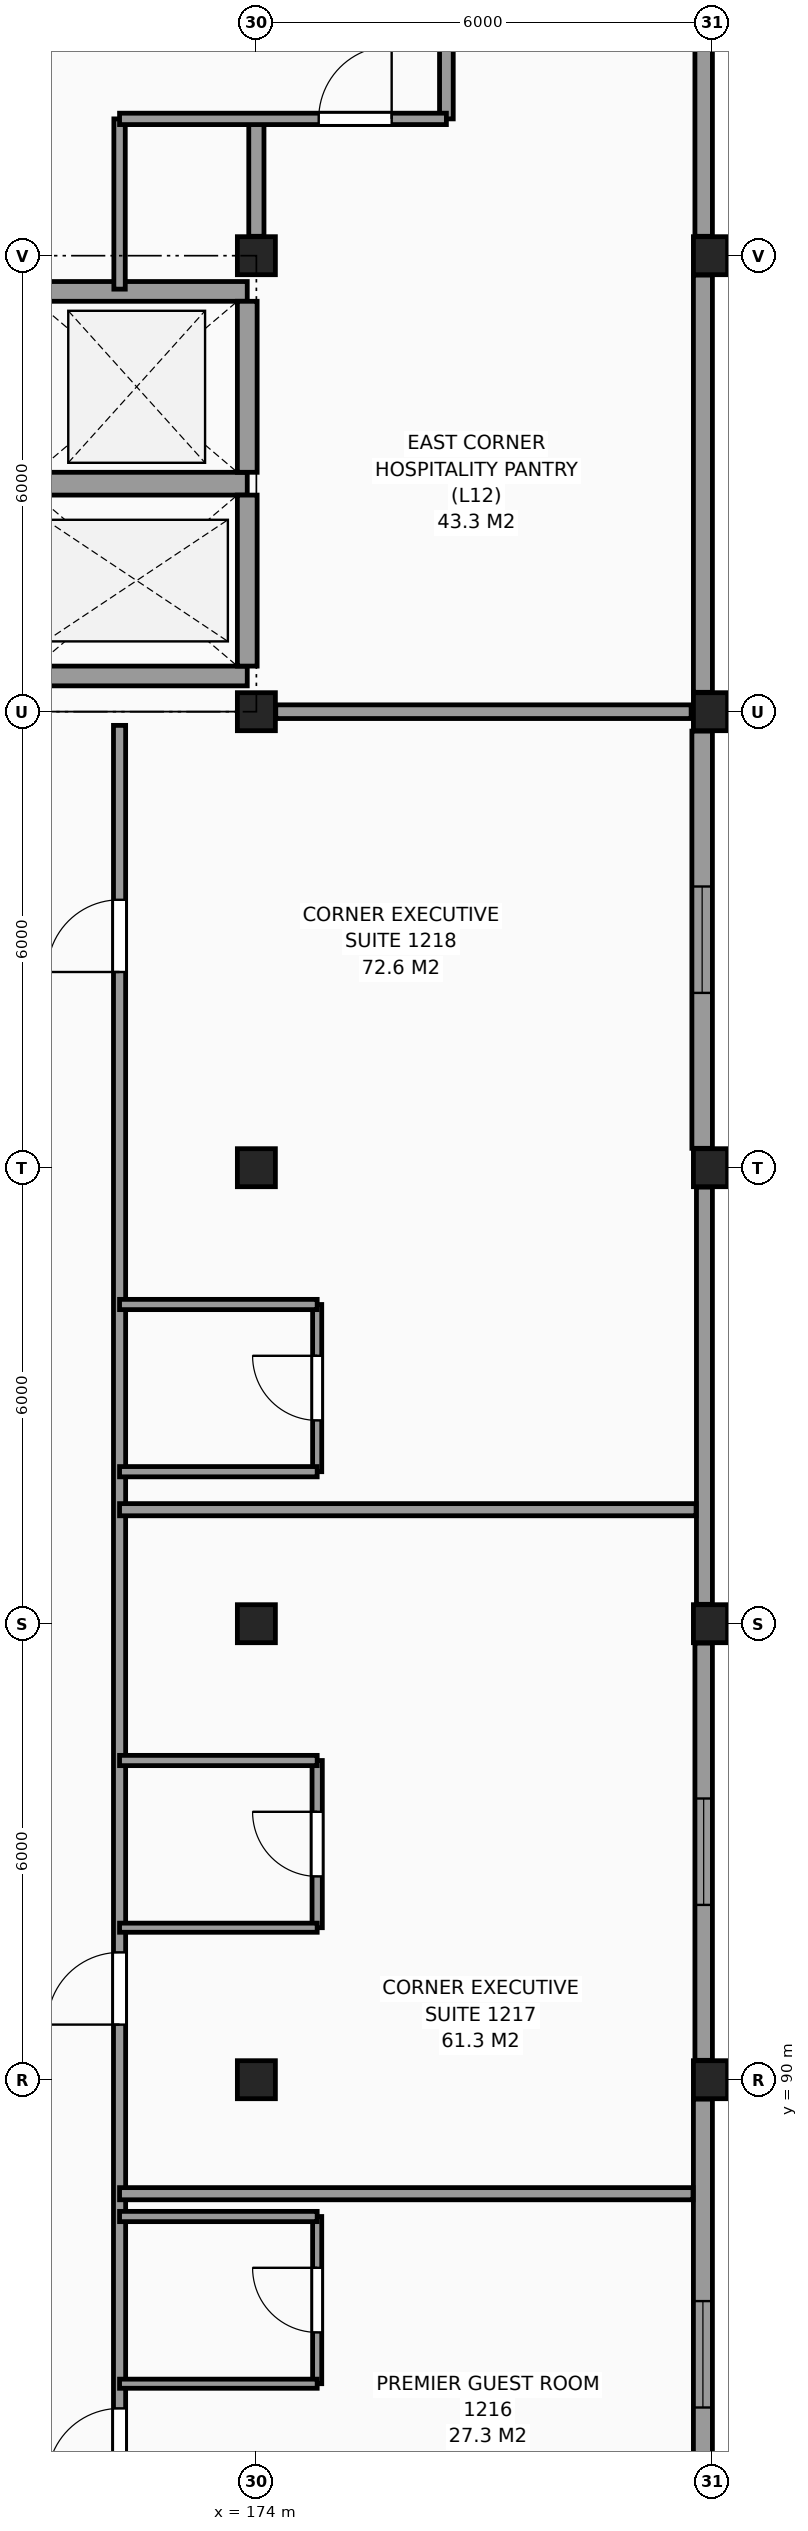
"""IFC4 building model, lengths in metres.
Left out: names, types, materials, properties, quantities, classifications, styles, units other than length and angle.
Written with IfcOpenShell. Run it as: python <this file> out.ifc"""

import sys

from ifc_helpers import new_model, si_unit, direction, frame, frame_2d, origin, origin_2d, place, context, subcontext, project, spatial, rectangle, extrude, element, fill, save


model = new_model("IFC4")
c1 = context("Model", 3, precision=1e-05, world=origin(), true_north=direction((0.0, 1.0)))
c2 = subcontext(c1, "Body", "Model", "MODEL_VIEW")
j1 = project(units=[si_unit("LENGTHUNIT", "METRE"), si_unit("PLANEANGLEUNIT", "RADIAN")], contexts=[c1])
p1 = place(None, origin())
s1 = spatial("IfcSite", under=j1, at=p1, CompositionType="ELEMENT")
p2 = place(p1, origin())
s2 = spatial("IfcBuilding", under=s1, at=p2, CompositionType="ELEMENT")
p3 = place(p2, frame((0.0, 0.0, 48.0)))
s3 = spatial("IfcBuildingStorey", under=s2, at=p3, CompositionType="ELEMENT", Elevation=48.0)
for number, where, z_axis, x_axis in (
    (1, (174.0, 90.0, 0.0), (0.0, 0.0, 1.0), (1.0, 0.0, 0.0)),
    (2, (174.0, 96.0, 0.0), (0.0, 0.0, 1.0), (1.0, 0.0, 0.0)),
    (3, (174.0, 102.0, 0.0), (0.0, 0.0, 1.0), (1.0, 0.0, 0.0)),
    (4, (174.0, 108.0, 0.0), (0.0, 0.0, 1.0), (1.0, 0.0, 0.0)),
    (5, (174.0, 114.0, 0.0), (0.0, 0.0, 1.0), (1.0, 0.0, 0.0)),
    (6, (180.0, 90.0, 0.0), (0.0, 0.0, 1.0), (1.0, 0.0, 0.0)),
    (7, (180.0, 96.0, 0.0), (0.0, 0.0, 1.0), (1.0, 0.0, 0.0)),
    (8, (180.0, 102.0, 0.0), (0.0, 0.0, 1.0), (1.0, 0.0, 0.0)),
    (9, (180.0, 108.0, 0.0), (0.0, 0.0, 1.0), (1.0, 0.0, 0.0)),
    (10, (180.0, 114.0, 0.0), (0.0, 0.0, 1.0), (1.0, 0.0, 0.0)),
):
    element("IfcColumn", number, at=place(p3, frame(where, z_axis=z_axis, x_axis=x_axis)), inside=s3, PredefinedType="COLUMN", context=c2, shape_type="SweptSolid", body=[
        extrude(rectangle(XDim=0.5, YDim=0.5, at=origin_2d()), origin(), (0.0, 0.0, 1.0), 3.3),
    ])
p4 = place(p3, frame((179.875, 84.255, 0.0), z_axis=(0.0, 0.0, 1.0), x_axis=(0.0, 1.0, 0.0)))
e11 = element("IfcWall", 11, at=p4, inside=s3, PredefinedType="SOLIDWALL", context=c2, shape_type="SweptSolid", body=[
    extrude(rectangle(XDim=5.49, YDim=0.25, at=frame_2d((2.745, 0.0))), origin(), (0.0, 0.0, 1.0), 2.4),
])
p5 = place(p4, frame((1.432, 0.0, 0.8)))
e12 = element("IfcOpeningElement", 12, at=p5, cuts=e11, PredefinedType="OPENING", context=c2, shape_type="SweptSolid", body=[
    extrude(rectangle(XDim=1.4, YDim=1.4, at=frame_2d((0.7, 0.7))), frame((0.0, 0.135, 0.0), z_axis=(0.0, -1.0, 0.0), x_axis=(1.0, 0.0, 0.0)), (0.0, 0.0, 1.0), 0.27),
])
p6 = place(p3, frame((179.885, 90.255, 0.0), z_axis=(0.0, 0.0, 1.0), x_axis=(0.0, 1.0, 0.0)))
e13 = element("IfcWall", 13, at=p6, inside=s3, PredefinedType="SOLIDWALL", context=c2, shape_type="SweptSolid", body=[
    extrude(rectangle(XDim=5.49, YDim=0.23, at=frame_2d((2.745, 0.0))), origin(), (0.0, 0.0, 1.0), 2.4),
])
p7 = place(p6, frame((2.045, 0.0, 0.8)))
e14 = element("IfcOpeningElement", 14, at=p7, cuts=e13, PredefinedType="OPENING", context=c2, shape_type="SweptSolid", body=[
    extrude(rectangle(XDim=1.4, YDim=1.4, at=frame_2d((0.7, 0.7))), frame((0.0, 0.125, 0.0), z_axis=(0.0, -1.0, 0.0), x_axis=(1.0, 0.0, 0.0)), (0.0, 0.0, 1.0), 0.25),
])
p8 = place(p3, frame((179.895, 96.255, 0.0), z_axis=(0.0, 0.0, 1.0), x_axis=(0.0, 1.0, 0.0)))
e15 = element("IfcWall", 15, at=p8, inside=s3, PredefinedType="SOLIDWALL", context=c2, shape_type="SweptSolid", body=[
    extrude(rectangle(XDim=5.49, YDim=0.21, at=frame_2d((2.745, 0.0))), origin(), (0.0, 0.0, 1.0), 2.4),
])
p9 = place(p3, frame((179.865, 102.255, 0.0), z_axis=(0.0, 0.0, 1.0), x_axis=(0.0, 1.0, 0.0)))
e16 = element("IfcWall", 16, at=p9, inside=s3, PredefinedType="SOLIDWALL", context=c2, shape_type="SweptSolid", body=[
    extrude(rectangle(XDim=5.49, YDim=0.27, at=frame_2d((2.745, 0.0))), origin(), (0.0, 0.0, 1.0), 2.4),
])
p10 = place(p9, frame((2.045, 0.0, 0.8)))
e17 = element("IfcOpeningElement", 17, at=p10, cuts=e16, PredefinedType="OPENING", context=c2, shape_type="SweptSolid", body=[
    extrude(rectangle(XDim=1.4, YDim=1.4, at=frame_2d((0.7, 0.7))), frame((0.0, 0.145, 0.0), z_axis=(0.0, -1.0, 0.0), x_axis=(1.0, 0.0, 0.0)), (0.0, 0.0, 1.0), 0.29),
])
p11 = place(p3, frame((179.875, 108.255, 0.0), z_axis=(0.0, 0.0, 1.0), x_axis=(0.0, 1.0, 0.0)))
e18 = element("IfcWall", 18, at=p11, inside=s3, PredefinedType="SOLIDWALL", context=c2, shape_type="SweptSolid", body=[
    extrude(rectangle(XDim=5.49, YDim=0.25, at=frame_2d((2.745, 0.0))), origin(), (0.0, 0.0, 1.0), 2.4),
])
p12 = place(p3, frame((179.885, 114.255, 0.0), z_axis=(0.0, 0.0, 1.0), x_axis=(0.0, 1.0, 0.0)))
e19 = element("IfcWall", 19, at=p12, inside=s3, PredefinedType="SOLIDWALL", context=c2, shape_type="SweptSolid", body=[
    extrude(rectangle(XDim=5.49, YDim=0.23, at=frame_2d((2.745, 0.0))), origin(), (0.0, 0.0, 1.0), 2.4),
])
p13 = place(p3, frame((170.97, 108.47, 0.0), z_axis=(0.0, 0.0, 1.0), x_axis=(1.0, 0.0, 0.0)))
e20 = element("IfcWall", 20, at=p13, inside=s3, PredefinedType="SHEAR", context=c2, shape_type="SweptSolid", body=[
    extrude(rectangle(XDim=2.91, YDim=0.26, at=frame_2d((1.455, 0.0))), origin(), (0.0, 0.0, 1.0), 3.3),
])
p14 = place(p3, frame((170.97, 111.0, 0.0), z_axis=(0.0, 0.0, 1.0), x_axis=(1.0, 0.0, 0.0)))
e21 = element("IfcWall", 21, at=p14, inside=s3, PredefinedType="SHEAR", context=c2, shape_type="SweptSolid", body=[
    extrude(rectangle(XDim=2.91, YDim=0.3, at=frame_2d((1.455, 0.0))), origin(), (0.0, 0.0, 1.0), 3.3),
])
p15 = place(p3, frame((173.88, 108.6, 0.0), z_axis=(0.0, 0.0, 1.0), x_axis=(0.0, 1.0, 0.0)))
e22 = element("IfcWall", 22, at=p15, inside=s3, PredefinedType="SHEAR", context=c2, shape_type="SweptSolid", body=[
    extrude(rectangle(XDim=2.25, YDim=0.26, at=frame_2d((1.125, 0.0))), origin(), (0.0, 0.0, 1.0), 3.3),
])
p16 = place(p3, frame((170.97, 113.53, 0.0), z_axis=(0.0, 0.0, 1.0), x_axis=(1.0, 0.0, 0.0)))
e23 = element("IfcWall", 23, at=p16, inside=s3, PredefinedType="SHEAR", context=c2, shape_type="SweptSolid", body=[
    extrude(rectangle(XDim=2.91, YDim=0.26, at=frame_2d((1.455, 0.0))), origin(), (0.0, 0.0, 1.0), 3.3),
])
p17 = place(p3, frame((173.88, 111.15, 0.0), z_axis=(0.0, 0.0, 1.0), x_axis=(0.0, 1.0, 0.0)))
e24 = element("IfcWall", 24, at=p17, inside=s3, PredefinedType="SHEAR", context=c2, shape_type="SweptSolid", body=[
    extrude(rectangle(XDim=2.25, YDim=0.26, at=frame_2d((1.125, 0.0))), origin(), (0.0, 0.0, 1.0), 3.3),
])
p18 = place(p3, frame((172.2, 66.235, 0.0), z_axis=(0.0, 0.0, 1.0), x_axis=(0.0, 1.0, 0.0)))
e25 = element("IfcWall", 25, at=p18, inside=s3, PredefinedType="PARTITIONING", context=c2, shape_type="SweptSolid", body=[
    extrude(rectangle(XDim=41.585, YDim=0.16, at=frame_2d((20.792, 0.0))), origin(), (0.0, 0.0, 1.0), 3.05),
])
p19 = place(p18, frame((7.59, 0.0, 0.0)))
e26 = element("IfcOpeningElement", 26, at=p19, cuts=e25, PredefinedType="OPENING", context=c2, shape_type="SweptSolid", body=[
    extrude(rectangle(XDim=0.95, YDim=2.1, at=frame_2d((0.475, 1.05))), frame((0.0, 0.09, 0.0), z_axis=(0.0, -1.0, 0.0), x_axis=(1.0, 0.0, 0.0)), (0.0, 0.0, 1.0), 0.18),
])
p20 = place(p18, frame((12.09, 0.0, 0.0)))
e27 = element("IfcOpeningElement", 27, at=p20, cuts=e25, PredefinedType="OPENING", context=c2, shape_type="SweptSolid", body=[
    extrude(rectangle(XDim=0.95, YDim=2.1, at=frame_2d((0.475, 1.05))), frame((0.0, 0.09, 0.0), z_axis=(0.0, -1.0, 0.0), x_axis=(1.0, 0.0, 0.0)), (0.0, 0.0, 1.0), 0.18),
])
p21 = place(p18, frame((16.29, 0.0, 0.0)))
e28 = element("IfcOpeningElement", 28, at=p21, cuts=e25, PredefinedType="OPENING", context=c2, shape_type="SweptSolid", body=[
    extrude(rectangle(XDim=0.95, YDim=2.1, at=frame_2d((0.475, 1.05))), frame((0.0, 0.09, 0.0), z_axis=(0.0, -1.0, 0.0), x_axis=(1.0, 0.0, 0.0)), (0.0, 0.0, 1.0), 0.18),
])
p22 = place(p18, frame((18.49, 0.0, 0.0)))
e29 = element("IfcOpeningElement", 29, at=p22, cuts=e25, PredefinedType="OPENING", context=c2, shape_type="SweptSolid", body=[
    extrude(rectangle(XDim=0.95, YDim=2.1, at=frame_2d((0.475, 1.05))), frame((0.0, 0.09, 0.0), z_axis=(0.0, -1.0, 0.0), x_axis=(1.0, 0.0, 0.0)), (0.0, 0.0, 1.0), 0.18),
])
p23 = place(p18, frame((24.49, 0.0, 0.0)))
e30 = element("IfcOpeningElement", 30, at=p23, cuts=e25, PredefinedType="OPENING", context=c2, shape_type="SweptSolid", body=[
    extrude(rectangle(XDim=0.95, YDim=2.1, at=frame_2d((0.475, 1.05))), frame((0.0, 0.09, 0.0), z_axis=(0.0, -1.0, 0.0), x_axis=(1.0, 0.0, 0.0)), (0.0, 0.0, 1.0), 0.18),
])
p24 = place(p18, frame((38.34, 0.0, 0.0)))
e31 = element("IfcOpeningElement", 31, at=p24, cuts=e25, PredefinedType="OPENING", context=c2, shape_type="SweptSolid", body=[
    extrude(rectangle(XDim=0.95, YDim=2.1, at=frame_2d((0.475, 1.05))), frame((0.0, 0.09, 0.0), z_axis=(0.0, -1.0, 0.0), x_axis=(1.0, 0.0, 0.0)), (0.0, 0.0, 1.0), 0.18),
])
p25 = place(p3, frame((172.2, 113.56, 0.0), z_axis=(0.0, 0.0, 1.0), x_axis=(0.0, 1.0, 0.0)))
e32 = element("IfcWall", 32, at=p25, inside=s3, PredefinedType="PARTITIONING", context=c2, shape_type="SweptSolid", body=[
    extrude(rectangle(XDim=2.24, YDim=0.15, at=frame_2d((1.12, 0.0))), origin(), (0.0, 0.0, 1.0), 3.05),
])
p26 = place(p3, frame((174.0, 114.255, 0.0), z_axis=(0.0, 0.0, 1.0), x_axis=(0.0, 1.0, 0.0)))
e33 = element("IfcWall", 33, at=p26, inside=s3, PredefinedType="PARTITIONING", context=c2, shape_type="SweptSolid", body=[
    extrude(rectangle(XDim=1.545, YDim=0.2, at=frame_2d((0.772, 0.0))), origin(), (0.0, 0.0, 1.0), 2.5),
])
p27 = place(p3, frame((174.8, 86.0, 0.0), z_axis=(0.0, 0.0, 1.0), x_axis=(0.0, 1.0, 0.0)))
e34 = element("IfcWall", 34, at=p27, inside=s3, PredefinedType="PARTITIONING", context=c2, shape_type="SweptSolid", body=[
    extrude(rectangle(XDim=2.2, YDim=0.12, at=frame_2d((1.1, 0.0))), origin(), (0.0, 0.0, 1.0), 3.05),
])
p28 = place(p27, frame((0.675, 0.0, 0.0)))
e35 = element("IfcOpeningElement", 35, at=p28, cuts=e34, PredefinedType="OPENING", context=c2, shape_type="SweptSolid", body=[
    extrude(rectangle(XDim=0.85, YDim=2.1, at=frame_2d((0.425, 1.05))), frame((0.0, 0.07, 0.0), z_axis=(0.0, -1.0, 0.0), x_axis=(1.0, 0.0, 0.0)), (0.0, 0.0, 1.0), 0.14),
])
p29 = place(p3, frame((174.8, 92.0, 0.0), z_axis=(0.0, 0.0, 1.0), x_axis=(0.0, 1.0, 0.0)))
e36 = element("IfcWall", 36, at=p29, inside=s3, PredefinedType="PARTITIONING", context=c2, shape_type="SweptSolid", body=[
    extrude(rectangle(XDim=2.2, YDim=0.135, at=frame_2d((1.1, 0.0))), origin(), (0.0, 0.0, 1.0), 3.05),
])
p30 = place(p29, frame((0.675, 0.0, 0.0)))
e37 = element("IfcOpeningElement", 37, at=p30, cuts=e36, PredefinedType="OPENING", context=c2, shape_type="SweptSolid", body=[
    extrude(rectangle(XDim=0.85, YDim=2.1, at=frame_2d((0.425, 1.05))), frame((0.0, 0.078, 0.0), z_axis=(0.0, -1.0, 0.0), x_axis=(1.0, 0.0, 0.0)), (0.0, 0.0, 1.0), 0.155),
])
p31 = place(p3, frame((174.8, 98.0, 0.0), z_axis=(0.0, 0.0, 1.0), x_axis=(0.0, 1.0, 0.0)))
e38 = element("IfcWall", 38, at=p31, inside=s3, PredefinedType="PARTITIONING", context=c2, shape_type="SweptSolid", body=[
    extrude(rectangle(XDim=2.2, YDim=0.12, at=frame_2d((1.1, 0.0))), origin(), (0.0, 0.0, 1.0), 3.05),
])
p32 = place(p31, frame((0.675, 0.0, 0.0)))
e39 = element("IfcOpeningElement", 39, at=p32, cuts=e38, PredefinedType="OPENING", context=c2, shape_type="SweptSolid", body=[
    extrude(rectangle(XDim=0.85, YDim=2.1, at=frame_2d((0.425, 1.05))), frame((0.0, 0.07, 0.0), z_axis=(0.0, -1.0, 0.0), x_axis=(1.0, 0.0, 0.0)), (0.0, 0.0, 1.0), 0.14),
])
p33 = place(p3, frame((176.5, 115.8, 0.0), z_axis=(0.0, 0.0, 1.0), x_axis=(0.0, 1.0, 0.0)))
e40 = element("IfcWall", 40, at=p33, inside=s3, PredefinedType="PARTITIONING", context=c2, shape_type="SweptSolid", body=[
    extrude(rectangle(XDim=2.4, YDim=0.18, at=frame_2d((1.2, 0.0))), origin(), (0.0, 0.0, 1.0), 3.05),
])
p34 = place(p3, frame((172.2, 86.0, 0.0), z_axis=(0.0, 0.0, 1.0), x_axis=(1.0, 0.0, 0.0)))
e41 = element("IfcWall", 41, at=p34, inside=s3, PredefinedType="PARTITIONING", context=c2, shape_type="SweptSolid", body=[
    extrude(rectangle(XDim=2.6, YDim=0.12, at=frame_2d((1.3, 0.0))), origin(), (0.0, 0.0, 1.0), 3.05),
])
p35 = place(p3, frame((172.2, 88.2, 0.0), z_axis=(0.0, 0.0, 1.0), x_axis=(1.0, 0.0, 0.0)))
e42 = element("IfcWall", 42, at=p35, inside=s3, PredefinedType="PARTITIONING", context=c2, shape_type="SweptSolid", body=[
    extrude(rectangle(XDim=2.6, YDim=0.135, at=frame_2d((1.3, 0.0))), origin(), (0.0, 0.0, 1.0), 3.05),
])
p36 = place(p3, frame((172.2, 88.5, 0.0), z_axis=(0.0, 0.0, 1.0), x_axis=(1.0, 0.0, 0.0)))
e43 = element("IfcWall", 43, at=p36, inside=s3, PredefinedType="PARTITIONING", context=c2, shape_type="SweptSolid", body=[
    extrude(rectangle(XDim=7.545, YDim=0.16, at=frame_2d((3.772, 0.0))), origin(), (0.0, 0.0, 1.0), 3.05),
])
p37 = place(p3, frame((172.2, 92.0, 0.0), z_axis=(0.0, 0.0, 1.0), x_axis=(1.0, 0.0, 0.0)))
e44 = element("IfcWall", 44, at=p37, inside=s3, PredefinedType="PARTITIONING", context=c2, shape_type="SweptSolid", body=[
    extrude(rectangle(XDim=2.6, YDim=0.12, at=frame_2d((1.3, 0.0))), origin(), (0.0, 0.0, 1.0), 3.05),
])
p38 = place(p3, frame((172.2, 94.2, 0.0), z_axis=(0.0, 0.0, 1.0), x_axis=(1.0, 0.0, 0.0)))
e45 = element("IfcWall", 45, at=p38, inside=s3, PredefinedType="PARTITIONING", context=c2, shape_type="SweptSolid", body=[
    extrude(rectangle(XDim=2.6, YDim=0.135, at=frame_2d((1.3, 0.0))), origin(), (0.0, 0.0, 1.0), 3.05),
])
p39 = place(p3, frame((172.2, 97.5, 0.0), z_axis=(0.0, 0.0, 1.0), x_axis=(1.0, 0.0, 0.0)))
e46 = element("IfcWall", 46, at=p39, inside=s3, PredefinedType="PARTITIONING", context=c2, shape_type="SweptSolid", body=[
    extrude(rectangle(XDim=7.585, YDim=0.16, at=frame_2d((3.792, 0.0))), origin(), (0.0, 0.0, 1.0), 3.05),
])
for number, where, z_axis, x_axis in (
    (47, (172.2, 98.0, 0.0), (0.0, 0.0, 1.0), (1.0, 0.0, 0.0)),
    (48, (172.2, 100.2, 0.0), (0.0, 0.0, 1.0), (1.0, 0.0, 0.0)),
):
    element("IfcWall", number, at=place(p3, frame(where, z_axis=z_axis, x_axis=x_axis)), inside=s3, PredefinedType="PARTITIONING", context=c2, shape_type="SweptSolid", body=[
        extrude(rectangle(XDim=2.6, YDim=0.135, at=frame_2d((1.3, 0.0))), origin(), (0.0, 0.0, 1.0), 3.05),
    ])
p40 = place(p3, frame((174.255, 108.0, 0.0), z_axis=(0.0, 0.0, 1.0), x_axis=(1.0, 0.0, 0.0)))
e49 = element("IfcWall", 49, at=p40, inside=s3, PredefinedType="PARTITIONING", context=c2, shape_type="SweptSolid", body=[
    extrude(rectangle(XDim=5.465, YDim=0.18, at=frame_2d((2.732, 0.0))), origin(), (0.0, 0.0, 1.0), 2.45),
])
p41 = place(p3, frame((172.2, 115.8, 0.0), z_axis=(0.0, 0.0, 1.0), x_axis=(1.0, 0.0, 0.0)))
e50 = element("IfcWall", 50, at=p41, inside=s3, PredefinedType="PARTITIONING", context=c2, shape_type="SweptSolid", body=[
    extrude(rectangle(XDim=4.3, YDim=0.15, at=frame_2d((2.15, 0.0))), origin(), (0.0, 0.0, 1.0), 3.05),
])
p42 = place(p41, frame((2.62, 0.0, 0.0)))
e51 = element("IfcOpeningElement", 51, at=p42, cuts=e50, PredefinedType="OPENING", context=c2, shape_type="SweptSolid", body=[
    extrude(rectangle(XDim=0.96, YDim=2.15, at=frame_2d((0.48, 1.075))), frame((0.0, 0.085, 0.0), z_axis=(0.0, -1.0, 0.0), x_axis=(1.0, 0.0, 0.0)), (0.0, 0.0, 1.0), 0.17),
])
p43 = place(p5, origin())
e52 = element("IfcWindow", 52, at=p43, inside=s3, PartitioningType="SINGLE_PANEL", PredefinedType="WINDOW", context=c2, shape_type="SweptSolid", body=[
    extrude(rectangle(XDim=1.4, YDim=1.4, at=frame_2d((0.7, 0.7))), frame((0.0, 0.03, 0.0), z_axis=(0.0, -1.0, 0.0), x_axis=(1.0, 0.0, 0.0)), (0.0, 0.0, 1.0), 0.06),
])
fill(e12, e52)
p44 = place(p7, origin())
e53 = element("IfcWindow", 53, at=p44, inside=s3, PartitioningType="SINGLE_PANEL", PredefinedType="WINDOW", context=c2, shape_type="SweptSolid", body=[
    extrude(rectangle(XDim=1.4, YDim=1.4, at=frame_2d((0.7, 0.7))), frame((0.0, 0.03, 0.0), z_axis=(0.0, -1.0, 0.0), x_axis=(1.0, 0.0, 0.0)), (0.0, 0.0, 1.0), 0.06),
])
fill(e14, e53)
p45 = place(p10, origin())
e54 = element("IfcWindow", 54, at=p45, inside=s3, PartitioningType="SINGLE_PANEL", PredefinedType="WINDOW", context=c2, shape_type="SweptSolid", body=[
    extrude(rectangle(XDim=1.4, YDim=1.4, at=frame_2d((0.7, 0.7))), frame((0.0, 0.03, 0.0), z_axis=(0.0, -1.0, 0.0), x_axis=(1.0, 0.0, 0.0)), (0.0, 0.0, 1.0), 0.06),
])
fill(e17, e54)
p46 = place(p28, origin())
e55 = element("IfcDoor", 55, at=p46, inside=s3, OperationType="SINGLE_SWING_RIGHT", PredefinedType="DOOR", context=c2, shape_type="SweptSolid", body=[
    extrude(rectangle(XDim=0.85, YDim=2.1, at=frame_2d((0.425, 1.05))), frame((0.0, 0.025, 0.0), z_axis=(0.0, -1.0, 0.0), x_axis=(1.0, 0.0, 0.0)), (0.0, 0.0, 1.0), 0.05),
])
fill(e35, e55)
p47 = place(p22, origin())
e56 = element("IfcDoor", 56, at=p47, inside=s3, OperationType="SINGLE_SWING_LEFT", PredefinedType="DOOR", context=c2, shape_type="SweptSolid", body=[
    extrude(rectangle(XDim=0.95, YDim=2.1, at=frame_2d((0.475, 1.05))), frame((0.0, 0.025, 0.0), z_axis=(0.0, -1.0, 0.0), x_axis=(1.0, 0.0, 0.0)), (0.0, 0.0, 1.0), 0.05),
])
fill(e29, e56)
p48 = place(p30, origin())
e57 = element("IfcDoor", 57, at=p48, inside=s3, OperationType="SINGLE_SWING_RIGHT", PredefinedType="DOOR", context=c2, shape_type="SweptSolid", body=[
    extrude(rectangle(XDim=0.85, YDim=2.1, at=frame_2d((0.425, 1.05))), frame((0.0, 0.025, 0.0), z_axis=(0.0, -1.0, 0.0), x_axis=(1.0, 0.0, 0.0)), (0.0, 0.0, 1.0), 0.05),
])
fill(e37, e57)
p49 = place(p23, origin())
e58 = element("IfcDoor", 58, at=p49, inside=s3, OperationType="SINGLE_SWING_LEFT", PredefinedType="DOOR", context=c2, shape_type="SweptSolid", body=[
    extrude(rectangle(XDim=0.95, YDim=2.1, at=frame_2d((0.475, 1.05))), frame((0.0, 0.025, 0.0), z_axis=(0.0, -1.0, 0.0), x_axis=(1.0, 0.0, 0.0)), (0.0, 0.0, 1.0), 0.05),
])
fill(e30, e58)
p50 = place(p32, origin())
e59 = element("IfcDoor", 59, at=p50, inside=s3, OperationType="SINGLE_SWING_RIGHT", PredefinedType="DOOR", context=c2, shape_type="SweptSolid", body=[
    extrude(rectangle(XDim=0.85, YDim=2.1, at=frame_2d((0.425, 1.05))), frame((0.0, 0.025, 0.0), z_axis=(0.0, -1.0, 0.0), x_axis=(1.0, 0.0, 0.0)), (0.0, 0.0, 1.0), 0.05),
])
fill(e39, e59)
p51 = place(p24, origin())
e60 = element("IfcDoor", 60, at=p51, inside=s3, OperationType="SINGLE_SWING_LEFT", PredefinedType="DOOR", context=c2, shape_type="SweptSolid", body=[
    extrude(rectangle(XDim=0.95, YDim=2.1, at=frame_2d((0.475, 1.05))), frame((0.0, 0.025, 0.0), z_axis=(0.0, -1.0, 0.0), x_axis=(1.0, 0.0, 0.0)), (0.0, 0.0, 1.0), 0.05),
])
fill(e31, e60)
p52 = place(p42, origin())
e61 = element("IfcDoor", 61, at=p52, inside=s3, OperationType="SINGLE_SWING_RIGHT", PredefinedType="DOOR", context=c2, shape_type="SweptSolid", body=[
    extrude(rectangle(XDim=0.96, YDim=2.15, at=frame_2d((0.48, 1.075))), frame((0.0, 0.025, 0.0), z_axis=(0.0, -1.0, 0.0), x_axis=(1.0, 0.0, 0.0)), (0.0, 0.0, 1.0), 0.05),
])
fill(e51, e61)
save(model, sys.argv[1])
